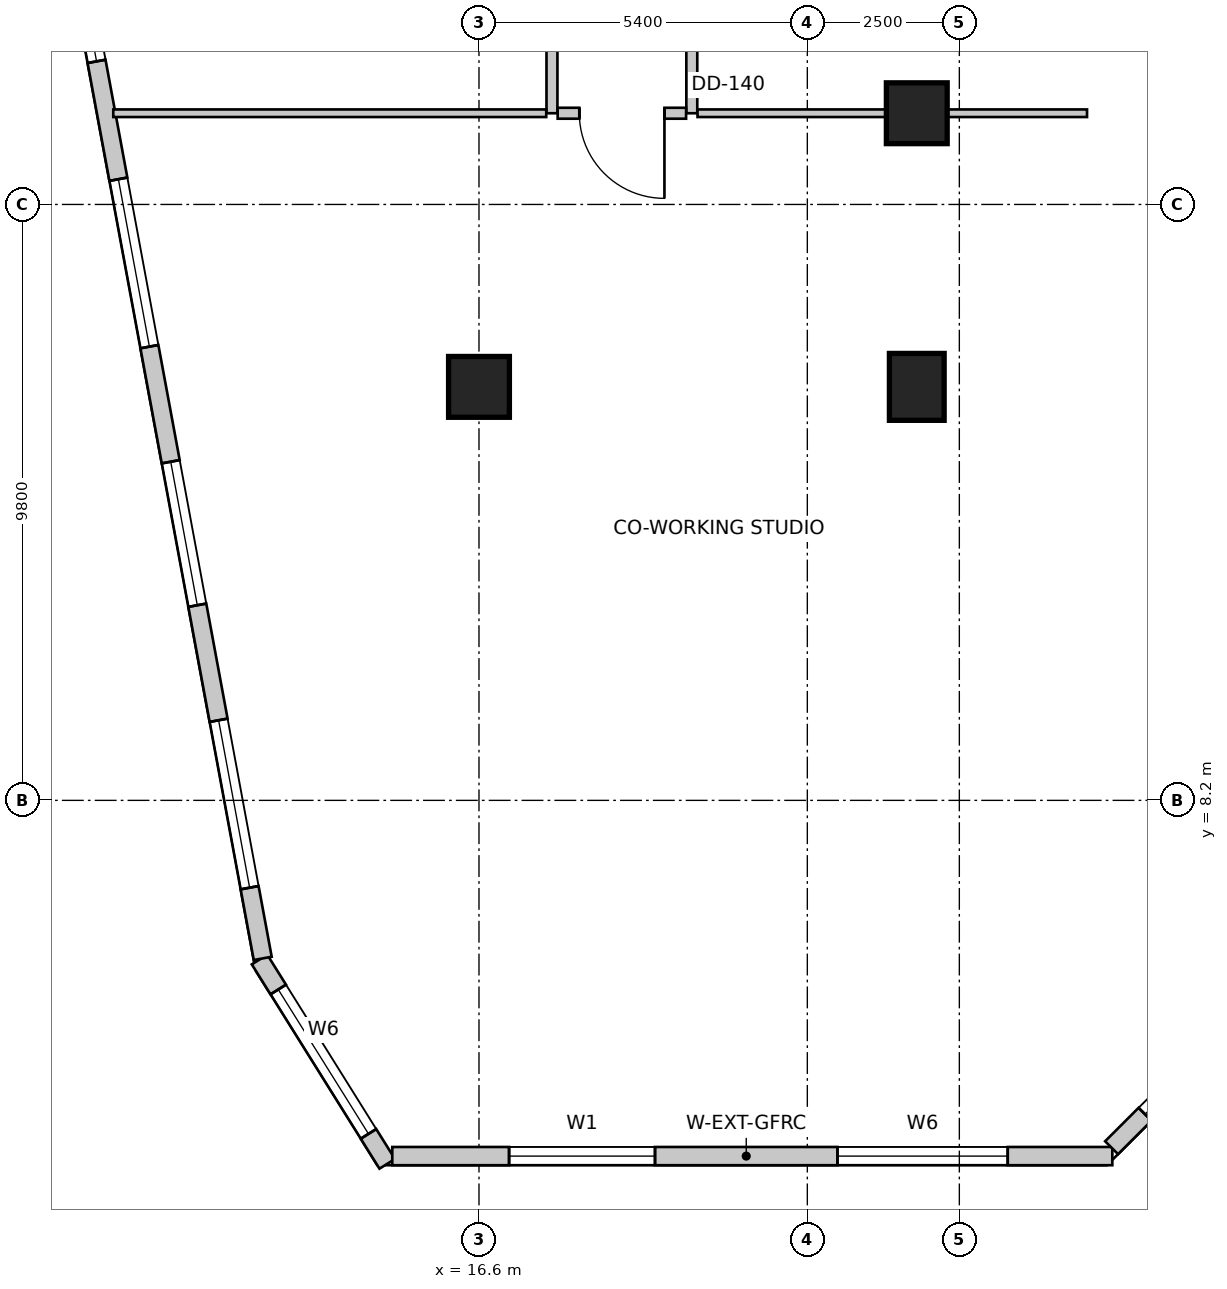
"""IFC4 building model, lengths in metres.
Left out: names, types, materials, properties, quantities, classifications, styles, units other than length and angle.
Written with IfcOpenShell. Run it as: python <this file> out.ifc"""

import sys

from ifc_helpers import new_model, si_unit, direction, frame, frame_2d, origin, origin_2d, place, context, subcontext, project, spatial, rectangle, extrude, source, transform, mapped, element, fill, save


model = new_model("IFC4")
c1 = context("Model", 3, precision=1e-05, world=origin(), true_north=direction((0.0, 1.0)))
c2 = subcontext(c1, "Body", "Model", "MODEL_VIEW")
j1 = project(units=[si_unit("LENGTHUNIT", "METRE"), si_unit("PLANEANGLEUNIT", "RADIAN")], contexts=[c1])
p1 = place(None, origin())
s1 = spatial("IfcSite", under=j1, at=p1, CompositionType="ELEMENT")
p2 = place(p1, origin())
s2 = spatial("IfcBuilding", under=s1, at=p2, CompositionType="ELEMENT")
p3 = place(p2, frame((0.0, 0.0, 95.0)))
s3 = spatial("IfcBuildingStorey", under=s2, at=p3, CompositionType="ELEMENT", Elevation=95.0)
m1 = source(origin(), c2, "Body", "SweptSolid", [
    extrude(rectangle(XDim=1.0, YDim=1.0, at=origin_2d()), origin(), (0.0, 0.0, 1.0), 4.0),
])
p4 = place(p3, frame((23.8, 19.5, 0.0), z_axis=(0.0, 0.0, 1.0), x_axis=(1.0, 0.0, 0.0)))
e1 = element("IfcColumn", 1, at=p4, inside=s3, PredefinedType="COLUMN", context=c2, shape_type="MappedRepresentation", body=[
    mapped(m1, transform((0.0, 0.0, 0.0), scale=1.0)),
])
m2 = source(origin(), c2, "Body", "SweptSolid", [
    extrude(rectangle(XDim=0.9, YDim=1.1, at=origin_2d()), origin(), (0.0, 0.0, 1.0), 4.0),
])
p5 = place(p3, frame((23.8, 15.0, 0.0), z_axis=(0.0, 0.0, 1.0), x_axis=(1.0, 0.0, 0.0)))
e2 = element("IfcColumn", 2, at=p5, inside=s3, PredefinedType="COLUMN", context=c2, shape_type="MappedRepresentation", body=[
    mapped(m2, transform((0.0, 0.0, 0.0), scale=1.0)),
])
p6 = place(p3, frame((16.6, 15.0, 0.0), z_axis=(0.0, 0.0, 1.0), x_axis=(1.0, 0.0, 0.0)))
e3 = element("IfcColumn", 3, at=p6, inside=s3, PredefinedType="COLUMN", context=c2, shape_type="MappedRepresentation", body=[
    mapped(m1, transform((0.0, 0.0, 0.0), scale=1.0)),
])
p7 = place(p3, frame((12.991, 5.583, 0.0), z_axis=(0.0, 0.0, 1.0), x_axis=(0.530015557218, -0.847987918019, 0.0)))
e4 = element("IfcWall", 4, at=p7, inside=s3, PredefinedType="SOLIDWALL", context=c2, shape_type="SweptSolid", body=[
    extrude(rectangle(XDim=3.962, YDim=0.3, at=frame_2d((1.981, 0.0))), origin(), (0.0, 0.0, 1.0), 3.7),
])
m3 = source(origin(), c2, "Body", "SweptSolid", [
    extrude(rectangle(XDim=2.8, YDim=2.4, at=frame_2d((1.4, 1.2))), frame((0.0, 0.16, 0.0), z_axis=(0.0, -1.0, 0.0), x_axis=(1.0, 0.0, 0.0)), (0.0, 0.0, 1.0), 0.32),
])
p8 = place(p7, frame((0.581, 0.0, 0.85)))
e5 = element("IfcOpeningElement", 5, at=p8, cuts=e4, PredefinedType="OPENING", context=c2, shape_type="MappedRepresentation", body=[
    mapped(m3, transform((0.0, 0.0, 0.0), scale=1.0)),
])
p9 = place(p3, frame((15.174, 2.35, 0.0), z_axis=(0.0, 0.0, 1.0), x_axis=(1.0, 0.0, 0.0)))
e6 = element("IfcWall", 6, at=p9, inside=s3, PredefinedType="SOLIDWALL", context=c2, shape_type="SweptSolid", body=[
    extrude(rectangle(XDim=11.842, YDim=0.3, at=frame_2d((5.921, 0.0))), origin(), (0.0, 0.0, 1.0), 3.7),
])
m4 = source(origin(), c2, "Body", "SweptSolid", [
    extrude(rectangle(XDim=2.4, YDim=2.2, at=frame_2d((1.2, 1.1))), frame((0.0, 0.16, 0.0), z_axis=(0.0, -1.0, 0.0), x_axis=(1.0, 0.0, 0.0)), (0.0, 0.0, 1.0), 0.32),
])
p10 = place(p9, frame((1.921, 0.0, 0.85)))
e7 = element("IfcOpeningElement", 7, at=p10, cuts=e6, PredefinedType="OPENING", context=c2, shape_type="MappedRepresentation", body=[
    mapped(m4, transform((0.0, 0.0, 0.0), scale=1.0)),
])
p11 = place(p9, frame((7.322, 0.0, 0.85)))
e8 = element("IfcOpeningElement", 8, at=p11, cuts=e6, PredefinedType="OPENING", context=c2, shape_type="MappedRepresentation", body=[
    mapped(m3, transform((0.0, 0.0, 0.0), scale=1.0)),
])
p12 = place(p3, frame((27.004, 2.488, 0.0), z_axis=(0.0, 0.0, 1.0), x_axis=(0.707106781187, 0.707106781187, 0.0)))
e9 = element("IfcWall", 9, at=p12, inside=s3, PredefinedType="SOLIDWALL", context=c2, shape_type="SweptSolid", body=[
    extrude(rectangle(XDim=4.356, YDim=0.3, at=frame_2d((2.178, 0.0))), origin(), (0.0, 0.0, 1.0), 3.7),
])
p13 = place(p12, frame((0.778, 0.0, 0.85)))
e10 = element("IfcOpeningElement", 10, at=p13, cuts=e9, PredefinedType="OPENING", context=c2, shape_type="MappedRepresentation", body=[
    mapped(m3, transform((0.0, 0.0, 0.0), scale=1.0)),
])
p14 = place(p3, frame((8.183, 31.833, 0.0), z_axis=(0.0, 0.0, 1.0), x_axis=(0.18216364648, -0.983268226834, 0.0)))
e11 = element("IfcWall", 11, at=p14, inside=s3, PredefinedType="SOLIDWALL", context=c2, shape_type="SweptSolid", body=[
    extrude(rectangle(XDim=26.678, YDim=0.3, at=frame_2d((13.339, 0.0))), origin(), (0.0, 0.0, 1.0), 3.7),
])
p15 = place(p14, frame((2.952, 0.0, 0.85)))
e12 = element("IfcOpeningElement", 12, at=p15, cuts=e11, PredefinedType="OPENING", context=c2, shape_type="MappedRepresentation", body=[
    mapped(m3, transform((0.0, 0.0, 0.0), scale=1.0)),
])
p16 = place(p14, frame((8.876, 0.0, 0.85)))
e13 = element("IfcOpeningElement", 13, at=p16, cuts=e11, PredefinedType="OPENING", context=c2, shape_type="MappedRepresentation", body=[
    mapped(m3, transform((0.0, 0.0, 0.0), scale=1.0)),
])
p17 = place(p14, frame((13.647, 0.0, 0.85)))
e14 = element("IfcOpeningElement", 14, at=p17, cuts=e11, PredefinedType="OPENING", context=c2, shape_type="MappedRepresentation", body=[
    mapped(m3, transform((0.0, 0.0, 0.0), scale=1.0)),
])
p18 = place(p14, frame((18.372, 0.0, 0.85)))
e15 = element("IfcOpeningElement", 15, at=p18, cuts=e11, PredefinedType="OPENING", context=c2, shape_type="MappedRepresentation", body=[
    mapped(m4, transform((0.0, 0.0, 0.0), scale=1.0)),
])
p19 = place(p14, frame((22.696, 0.0, 0.85)))
e16 = element("IfcOpeningElement", 16, at=p19, cuts=e11, PredefinedType="OPENING", context=c2, shape_type="MappedRepresentation", body=[
    mapped(m3, transform((0.0, 0.0, 0.0), scale=1.0)),
])
p20 = place(p3, frame((17.8, 19.5, 0.0), z_axis=(0.0, 0.0, 1.0), x_axis=(0.0, 1.0, 0.0)))
e17 = element("IfcWall", 17, at=p20, inside=s3, PredefinedType="PARTITIONING", context=c2, shape_type="SweptSolid", body=[
    extrude(rectangle(XDim=4.338, YDim=0.18, at=frame_2d((2.169, 0.0))), origin(), (0.0, 0.0, 1.0), 3.272),
])
m5 = source(origin(), c2, "Body", "SweptSolid", [
    extrude(rectangle(XDim=0.9, YDim=2.15, at=frame_2d((0.45, 1.075))), frame((0.0, 0.1, 0.0), z_axis=(0.0, -1.0, 0.0), x_axis=(1.0, 0.0, 0.0)), (0.0, 0.0, 1.0), 0.2),
])
p21 = place(p20, frame((1.656, 0.0, 0.0)))
e18 = element("IfcOpeningElement", 18, at=p21, cuts=e17, PredefinedType="OPENING", context=c2, shape_type="MappedRepresentation", body=[
    mapped(m5, transform((0.0, 0.0, 0.0), scale=1.0)),
])
p22 = place(p3, frame((20.1, 23.838, 0.0), z_axis=(0.0, 0.0, 1.0), x_axis=(0.0, -1.0, 0.0)))
e19 = element("IfcWall", 19, at=p22, inside=s3, PredefinedType="PARTITIONING", context=c2, shape_type="SweptSolid", body=[
    extrude(rectangle(XDim=4.338, YDim=0.18, at=frame_2d((2.169, 0.0))), origin(), (0.0, 0.0, 1.0), 3.272),
])
p23 = place(p22, frame((1.656, 0.0, 0.0)))
e20 = element("IfcOpeningElement", 20, at=p23, cuts=e19, PredefinedType="OPENING", context=c2, shape_type="MappedRepresentation", body=[
    mapped(m5, transform((0.0, 0.0, 0.0), scale=1.0)),
])
p24 = place(p3, frame((20.006, 19.5, 0.0), z_axis=(0.0, 0.0, 1.0), x_axis=(-1.0, 0.0, 0.0)))
e21 = element("IfcWall", 21, at=p24, inside=s3, PredefinedType="PARTITIONING", context=c2, shape_type="SweptSolid", body=[
    extrude(rectangle(XDim=2.112, YDim=0.18, at=frame_2d((1.056, 0.0))), origin(), (0.0, 0.0, 1.0), 3.7),
])
m6 = source(origin(), c2, "Body", "SweptSolid", [
    extrude(rectangle(XDim=1.4, YDim=2.15, at=frame_2d((0.7, 1.075))), frame((0.0, 0.1, 0.0), z_axis=(0.0, -1.0, 0.0), x_axis=(1.0, 0.0, 0.0)), (0.0, 0.0, 1.0), 0.2),
])
p25 = place(p24, frame((0.356, 0.0, 0.0)))
e22 = element("IfcOpeningElement", 22, at=p25, cuts=e21, PredefinedType="OPENING", context=c2, shape_type="MappedRepresentation", body=[
    mapped(m6, transform((0.0, 0.0, 0.0), scale=1.0)),
])
p26 = place(p3, frame((17.706, 19.5, 0.0), z_axis=(0.0, 0.0, 1.0), x_axis=(-1.0, 0.0, 0.0)))
e23 = element("IfcWall", 23, at=p26, inside=s3, PredefinedType="PARTITIONING", context=c2, shape_type="SweptSolid", body=[
    extrude(rectangle(XDim=7.121, YDim=0.125, at=frame_2d((3.561, 0.0))), origin(), (0.0, 0.0, 1.0), 3.7),
])
p27 = place(p3, frame((26.6, 19.5, 0.0), z_axis=(0.0, 0.0, 1.0), x_axis=(-1.0, 0.0, 0.0)))
e24 = element("IfcWall", 24, at=p27, inside=s3, PredefinedType="PARTITIONING", context=c2, shape_type="SweptSolid", body=[
    extrude(rectangle(XDim=6.406, YDim=0.125, at=frame_2d((3.203, 0.0))), origin(), (0.0, 0.0, 1.0), 2.842),
])
m7 = source(origin(), c2, "Body", "SweptSolid", [
    extrude(rectangle(XDim=2.8, YDim=2.4, at=frame_2d((1.4, 1.2))), frame((0.0, -0.015, 0.0), z_axis=(0.0, -1.0, 0.0), x_axis=(1.0, 0.0, 0.0)), (0.0, 0.0, 1.0), 0.06),
])
p28 = place(p8, origin())
e25 = element("IfcWindow", 25, at=p28, inside=s3, PartitioningType="SINGLE_PANEL", PredefinedType="WINDOW", context=c2, shape_type="MappedRepresentation", body=[
    mapped(m7, transform((0.0, 0.0, 0.0), scale=1.0)),
])
fill(e5, e25)
m8 = source(origin(), c2, "Body", "SweptSolid", [
    extrude(rectangle(XDim=2.4, YDim=2.2, at=frame_2d((1.2, 1.1))), frame((0.0, -0.015, 0.0), z_axis=(0.0, -1.0, 0.0), x_axis=(1.0, 0.0, 0.0)), (0.0, 0.0, 1.0), 0.06),
])
p29 = place(p10, origin())
e26 = element("IfcWindow", 26, at=p29, inside=s3, PartitioningType="SINGLE_PANEL", PredefinedType="WINDOW", context=c2, shape_type="MappedRepresentation", body=[
    mapped(m8, transform((0.0, 0.0, 0.0), scale=1.0)),
])
fill(e7, e26)
p30 = place(p11, origin())
e27 = element("IfcWindow", 27, at=p30, inside=s3, PartitioningType="SINGLE_PANEL", PredefinedType="WINDOW", context=c2, shape_type="MappedRepresentation", body=[
    mapped(m7, transform((0.0, 0.0, 0.0), scale=1.0)),
])
fill(e8, e27)
p31 = place(p13, origin())
e28 = element("IfcWindow", 28, at=p31, inside=s3, PartitioningType="SINGLE_PANEL", PredefinedType="WINDOW", context=c2, shape_type="MappedRepresentation", body=[
    mapped(m7, transform((0.0, 0.0, 0.0), scale=1.0)),
])
fill(e10, e28)
p32 = place(p16, origin())
e29 = element("IfcWindow", 29, at=p32, inside=s3, PartitioningType="SINGLE_PANEL", PredefinedType="WINDOW", context=c2, shape_type="MappedRepresentation", body=[
    mapped(m7, transform((0.0, 0.0, 0.0), scale=1.0)),
])
fill(e13, e29)
p33 = place(p17, origin())
e30 = element("IfcWindow", 30, at=p33, inside=s3, PartitioningType="SINGLE_PANEL", PredefinedType="WINDOW", context=c2, shape_type="MappedRepresentation", body=[
    mapped(m7, transform((0.0, 0.0, 0.0), scale=1.0)),
])
fill(e14, e30)
p34 = place(p18, origin())
e31 = element("IfcWindow", 31, at=p34, inside=s3, PartitioningType="SINGLE_PANEL", PredefinedType="WINDOW", context=c2, shape_type="MappedRepresentation", body=[
    mapped(m8, transform((0.0, 0.0, 0.0), scale=1.0)),
])
fill(e15, e31)
p35 = place(p19, origin())
e32 = element("IfcWindow", 32, at=p35, inside=s3, PartitioningType="SINGLE_PANEL", PredefinedType="WINDOW", context=c2, shape_type="MappedRepresentation", body=[
    mapped(m7, transform((0.0, 0.0, 0.0), scale=1.0)),
])
fill(e16, e32)
m9 = source(origin(), c2, "Body", "SweptSolid", [
    extrude(rectangle(XDim=1.4, YDim=2.15, at=frame_2d((0.7, 1.075))), frame((0.0, 0.025, 0.0), z_axis=(0.0, -1.0, 0.0), x_axis=(1.0, 0.0, 0.0)), (0.0, 0.0, 1.0), 0.05),
])
p36 = place(p25, origin())
e33 = element("IfcDoor", 33, at=p36, inside=s3, OperationType="SINGLE_SWING_LEFT", PredefinedType="DOOR", context=c2, shape_type="MappedRepresentation", body=[
    mapped(m9, transform((0.0, 0.0, 0.0), scale=1.0)),
])
fill(e22, e33)
save(model, sys.argv[1])
